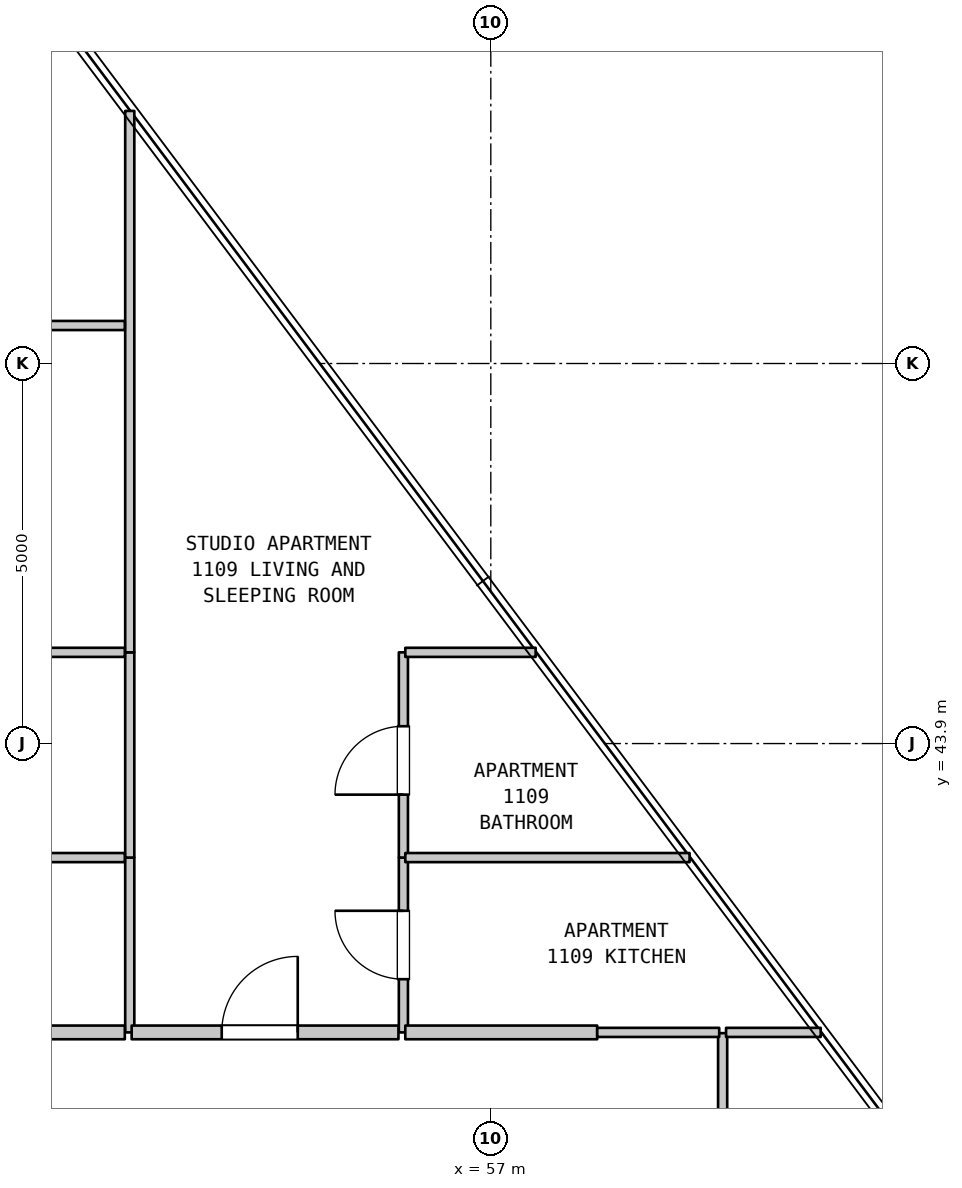
"""IFC4 building model, lengths in metres.
Left out: names, types, materials, properties, quantities, classifications, styles, units other than length and angle.
Written with IfcOpenShell. Run it as: python <this file> out.ifc"""

import sys

from ifc_helpers import new_model, si_unit, direction, frame, frame_2d, origin, place, context, subcontext, project, spatial, rectangle, extrude, element, fill, save


model = new_model("IFC4")
c1 = context("Model", 3, precision=1e-05, world=origin(), true_north=direction((0.0, 1.0)))
c2 = subcontext(c1, "Body", "Model", "MODEL_VIEW")
j1 = project(units=[si_unit("LENGTHUNIT", "METRE"), si_unit("PLANEANGLEUNIT", "RADIAN")], contexts=[c1])
p1 = place(None, origin())
s1 = spatial("IfcSite", under=j1, at=p1, CompositionType="ELEMENT")
p2 = place(p1, origin())
s2 = spatial("IfcBuilding", under=s1, at=p2, CompositionType="ELEMENT")
p3 = place(p2, frame((0.0, 0.0, 49.9)))
s3 = spatial("IfcBuildingStorey", under=s2, at=p3, CompositionType="ELEMENT", Elevation=49.9)
p4 = place(p3, frame((52.25, 40.1, 0.0), z_axis=(0.0, 0.0, 1.0), x_axis=(0.0, 1.0, 0.0)))
e1 = element("IfcWall", 1, at=p4, inside=s3, PredefinedType="PARTITIONING", context=c2, shape_type="SweptSolid", body=[
    extrude(rectangle(XDim=2.3, YDim=0.12, at=frame_2d((1.15, 0.0))), origin(), (0.0, 0.0, 1.0), 3.385),
])
p5 = place(p3, frame((52.25, 42.4, 0.0), z_axis=(0.0, 0.0, 1.0), x_axis=(0.0, 1.0, 0.0)))
e2 = element("IfcWall", 2, at=p5, inside=s3, PredefinedType="PARTITIONING", context=c2, shape_type="SweptSolid", body=[
    extrude(rectangle(XDim=2.7, YDim=0.12, at=frame_2d((1.35, 0.0))), origin(), (0.0, 0.0, 1.0), 3.385),
])
p6 = place(p3, frame((52.25, 45.1, 0.0), z_axis=(0.0, 0.0, 1.0), x_axis=(0.0, 1.0, 0.0)))
e3 = element("IfcWall", 3, at=p6, inside=s3, PredefinedType="PARTITIONING", context=c2, shape_type="SweptSolid", body=[
    extrude(rectangle(XDim=7.123, YDim=0.12, at=frame_2d((3.562, 0.0))), origin(), (0.0, 0.0, 1.0), 3.385),
])
p7 = place(p3, frame((55.85, 40.1, 0.0), z_axis=(0.0, 0.0, 1.0), x_axis=(0.0, 1.0, 0.0)))
e4 = element("IfcWall", 4, at=p7, inside=s3, PredefinedType="PARTITIONING", context=c2, shape_type="SweptSolid", body=[
    extrude(rectangle(XDim=2.3, YDim=0.12, at=frame_2d((1.15, 0.0))), origin(), (0.0, 0.0, 1.0), 3.385),
])
p8 = place(p7, frame((0.7, 0.0, 0.0)))
e5 = element("IfcOpeningElement", 5, at=p8, cuts=e4, PredefinedType="OPENING", context=c2, shape_type="SweptSolid", body=[
    extrude(rectangle(XDim=0.9, YDim=2.15, at=frame_2d((0.45, 1.075))), frame((0.0, 0.07, 0.0), z_axis=(0.0, -1.0, 0.0), x_axis=(1.0, 0.0, 0.0)), (0.0, 0.0, 1.0), 0.14),
])
p9 = place(p3, frame((55.85, 42.4, 0.0), z_axis=(0.0, 0.0, 1.0), x_axis=(0.0, 1.0, 0.0)))
e6 = element("IfcWall", 6, at=p9, inside=s3, PredefinedType="PARTITIONING", context=c2, shape_type="SweptSolid", body=[
    extrude(rectangle(XDim=2.7, YDim=0.12, at=frame_2d((1.35, 0.0))), origin(), (0.0, 0.0, 1.0), 3.385),
])
p10 = place(p9, frame((0.828, 0.0, 0.0)))
e7 = element("IfcOpeningElement", 7, at=p10, cuts=e6, PredefinedType="OPENING", context=c2, shape_type="SweptSolid", body=[
    extrude(rectangle(XDim=0.9, YDim=2.1, at=frame_2d((0.45, 1.05))), frame((0.0, 0.07, 0.0), z_axis=(0.0, -1.0, 0.0), x_axis=(1.0, 0.0, 0.0)), (0.0, 0.0, 1.0), 0.14),
])
p11 = place(p3, frame((60.05, 37.89, 0.0), z_axis=(0.0, 0.0, 1.0), x_axis=(0.0, 1.0, 0.0)))
e8 = element("IfcWall", 8, at=p11, inside=s3, PredefinedType="PARTITIONING", context=c2, shape_type="SweptSolid", body=[
    extrude(rectangle(XDim=2.2, YDim=0.12, at=frame_2d((1.1, 0.0))), origin(), (0.0, 0.0, 1.0), 3.385),
])
p12 = place(p3, frame((46.845, 40.1, 0.0), z_axis=(0.0, 0.0, 1.0), x_axis=(1.0, 0.0, 0.0)))
e9 = element("IfcWall", 9, at=p12, inside=s3, PredefinedType="STANDARD", context=c2, shape_type="SweptSolid", body=[
    extrude(rectangle(XDim=5.34, YDim=0.18, at=frame_2d((2.67, 0.0))), origin(), (0.0, 0.0, 1.0), 3.385),
])
p13 = place(p3, frame((52.275, 40.1, 0.0), z_axis=(0.0, 0.0, 1.0), x_axis=(1.0, 0.0, 0.0)))
e10 = element("IfcWall", 10, at=p13, inside=s3, PredefinedType="STANDARD", context=c2, shape_type="SweptSolid", body=[
    extrude(rectangle(XDim=3.51, YDim=0.18, at=frame_2d((1.755, 0.0))), origin(), (0.0, 0.0, 1.0), 3.385),
])
p14 = place(p13, frame((1.185, 0.0, 0.0)))
e11 = element("IfcOpeningElement", 11, at=p14, cuts=e10, PredefinedType="OPENING", context=c2, shape_type="SweptSolid", body=[
    extrude(rectangle(XDim=1.0, YDim=2.15, at=frame_2d((0.5, 1.075))), frame((0.0, 0.1, 0.0), z_axis=(0.0, -1.0, 0.0), x_axis=(1.0, 0.0, 0.0)), (0.0, 0.0, 1.0), 0.2),
])
p15 = place(p3, frame((55.875, 40.1, 0.0), z_axis=(0.0, 0.0, 1.0), x_axis=(1.0, 0.0, 0.0)))
e12 = element("IfcWall", 12, at=p15, inside=s3, PredefinedType="STANDARD", context=c2, shape_type="SweptSolid", body=[
    extrude(rectangle(XDim=2.525, YDim=0.18, at=frame_2d((1.262, 0.0))), origin(), (0.0, 0.0, 1.0), 3.385),
])
p16 = place(p3, frame((58.4, 40.1, 0.0), z_axis=(0.0, 0.0, 1.0), x_axis=(1.0, 0.0, 0.0)))
e13 = element("IfcWall", 13, at=p16, inside=s3, PredefinedType="PARTITIONING", context=c2, shape_type="SweptSolid", body=[
    extrude(rectangle(XDim=1.605, YDim=0.12, at=frame_2d((0.802, 0.0))), origin(), (0.0, 0.0, 1.0), 3.385),
])
p17 = place(p3, frame((60.095, 40.1, 0.0), z_axis=(0.0, 0.0, 1.0), x_axis=(1.0, 0.0, 0.0)))
e14 = element("IfcWall", 14, at=p17, inside=s3, PredefinedType="PARTITIONING", context=c2, shape_type="SweptSolid", body=[
    extrude(rectangle(XDim=1.245, YDim=0.12, at=frame_2d((0.623, 0.0))), origin(), (0.0, 0.0, 1.0), 3.385),
])
p18 = place(p3, frame((46.845, 42.4, 0.0), z_axis=(0.0, 0.0, 1.0), x_axis=(1.0, 0.0, 0.0)))
e15 = element("IfcWall", 15, at=p18, inside=s3, PredefinedType="PARTITIONING", context=c2, shape_type="SweptSolid", body=[
    extrude(rectangle(XDim=5.34, YDim=0.12, at=frame_2d((2.67, 0.0))), origin(), (0.0, 0.0, 1.0), 3.385),
])
p19 = place(p3, frame((55.875, 42.4, 0.0), z_axis=(0.0, 0.0, 1.0), x_axis=(1.0, 0.0, 0.0)))
e16 = element("IfcWall", 16, at=p19, inside=s3, PredefinedType="PARTITIONING", context=c2, shape_type="SweptSolid", body=[
    extrude(rectangle(XDim=3.74, YDim=0.12, at=frame_2d((1.87, 0.0))), origin(), (0.0, 0.0, 1.0), 3.385),
])
p20 = place(p3, frame((46.845, 45.1, 0.0), z_axis=(0.0, 0.0, 1.0), x_axis=(1.0, 0.0, 0.0)))
e17 = element("IfcWall", 17, at=p20, inside=s3, PredefinedType="PARTITIONING", context=c2, shape_type="SweptSolid", body=[
    extrude(rectangle(XDim=5.34, YDim=0.12, at=frame_2d((2.67, 0.0))), origin(), (0.0, 0.0, 1.0), 3.385),
])
p21 = place(p3, frame((55.875, 45.1, 0.0), z_axis=(0.0, 0.0, 1.0), x_axis=(1.0, 0.0, 0.0)))
e18 = element("IfcWall", 18, at=p21, inside=s3, PredefinedType="PARTITIONING", context=c2, shape_type="SweptSolid", body=[
    extrude(rectangle(XDim=1.715, YDim=0.12, at=frame_2d((0.857, 0.0))), origin(), (0.0, 0.0, 1.0), 3.385),
])
p22 = place(p3, frame((46.845, 49.4, 0.0), z_axis=(0.0, 0.0, 1.0), x_axis=(1.0, 0.0, 0.0)))
e19 = element("IfcWall", 19, at=p22, inside=s3, PredefinedType="PARTITIONING", context=c2, shape_type="SweptSolid", body=[
    extrude(rectangle(XDim=5.34, YDim=0.12, at=frame_2d((2.67, 0.0))), origin(), (0.0, 0.0, 1.0), 3.385),
])
p23 = place(p8, origin())
e20 = element("IfcDoor", 20, at=p23, inside=s3, OperationType="SINGLE_SWING_RIGHT", PredefinedType="DOOR", context=c2, shape_type="SweptSolid", body=[
    extrude(rectangle(XDim=0.9, YDim=2.15, at=frame_2d((0.45, 1.075))), frame((0.0, 0.025, 0.0), z_axis=(0.0, -1.0, 0.0), x_axis=(1.0, 0.0, 0.0)), (0.0, 0.0, 1.0), 0.05),
])
fill(e5, e20)
p24 = place(p10, origin())
e21 = element("IfcDoor", 21, at=p24, inside=s3, OperationType="SINGLE_SWING_LEFT", PredefinedType="DOOR", context=c2, shape_type="SweptSolid", body=[
    extrude(rectangle(XDim=0.9, YDim=2.1, at=frame_2d((0.45, 1.05))), frame((0.0, 0.025, 0.0), z_axis=(0.0, -1.0, 0.0), x_axis=(1.0, 0.0, 0.0)), (0.0, 0.0, 1.0), 0.05),
])
fill(e7, e21)
p25 = place(p14, origin())
e22 = element("IfcDoor", 22, at=p25, inside=s3, OperationType="SINGLE_SWING_RIGHT", PredefinedType="DOOR", context=c2, shape_type="SweptSolid", body=[
    extrude(rectangle(XDim=1.0, YDim=2.15, at=frame_2d((0.5, 1.075))), frame((0.0, 0.025, 0.0), z_axis=(0.0, -1.0, 0.0), x_axis=(1.0, 0.0, 0.0)), (0.0, 0.0, 1.0), 0.05),
])
fill(e11, e22)
save(model, sys.argv[1])
